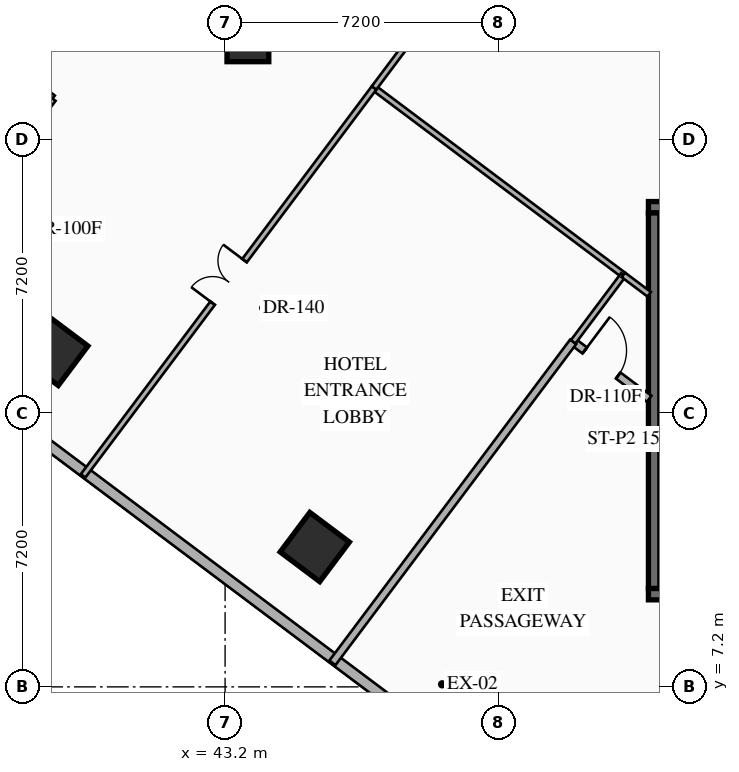
"""IFC4 building model, lengths in metres.
Left out: names, types, materials, properties, quantities, classifications, styles, units other than length and angle.
Written with IfcOpenShell. Run it as: python <this file> out.ifc"""

import sys

from ifc_helpers import new_model, si_unit, direction, frame, frame_2d, origin, origin_2d, place, context, subcontext, project, spatial, rectangle, extrude, element, fill, save


model = new_model("IFC4")
c1 = context("Model", 3, precision=1e-05, world=origin(), true_north=direction((0.0, 1.0)))
c2 = subcontext(c1, "Body", "Model", "MODEL_VIEW")
j1 = project(units=[si_unit("LENGTHUNIT", "METRE"), si_unit("PLANEANGLEUNIT", "RADIAN")], contexts=[c1])
p1 = place(None, origin())
s1 = spatial("IfcSite", under=j1, at=p1, CompositionType="ELEMENT")
p2 = place(p1, origin())
s2 = spatial("IfcBuilding", under=s1, at=p2, CompositionType="ELEMENT")
p3 = place(p2, origin())
s3 = spatial("IfcBuildingStorey", under=s2, at=p3, CompositionType="ELEMENT", Elevation=0.0)
p4 = place(p3, frame((54.34, 9.64, 0.0), z_axis=(0.0, 0.0, 1.0), x_axis=(1.0, 0.0, 0.0)))
e1 = element("IfcWall", 1, at=p4, inside=s3, PredefinedType="SHEAR", context=c2, shape_type="SweptSolid", body=[
    extrude(rectangle(XDim=5.17, YDim=0.3, at=frame_2d((2.585, 0.0))), origin(), (0.0, 0.0, 1.0), 5.4),
])
p5 = place(p4, frame((2.06, 0.0, 0.0)))
e2 = element("IfcOpeningElement", 2, at=p5, cuts=e1, PredefinedType="OPENING", context=c2, shape_type="SweptSolid", body=[
    extrude(rectangle(XDim=1.1, YDim=2.2, at=frame_2d((0.55, 1.1))), frame((0.0, 0.16, 0.0), z_axis=(0.0, -1.0, 0.0), x_axis=(1.0, 0.0, 0.0)), (0.0, 0.0, 1.0), 0.32),
])
p6 = place(p3, frame((54.34, 19.82, 0.0), z_axis=(0.0, 0.0, 1.0), x_axis=(1.0, 0.0, 0.0)))
e3 = element("IfcWall", 3, at=p6, inside=s3, PredefinedType="SHEAR", context=c2, shape_type="SweptSolid", body=[
    extrude(rectangle(XDim=5.17, YDim=0.3, at=frame_2d((2.585, 0.0))), origin(), (0.0, 0.0, 1.0), 5.4),
])
p7 = place(p3, frame((54.49, 9.79, 0.0), z_axis=(0.0, 0.0, 1.0), x_axis=(0.0, 1.0, 0.0)))
e4 = element("IfcWall", 4, at=p7, inside=s3, PredefinedType="SHEAR", context=c2, shape_type="SweptSolid", body=[
    extrude(rectangle(XDim=9.88, YDim=0.3, at=frame_2d((4.94, 0.0))), origin(), (0.0, 0.0, 1.0), 5.4),
])
p8 = place(p3, frame((43.8, 24.2, 0.0), z_axis=(0.0, 0.0, 1.0), x_axis=(1.0, 0.0, 0.0)))
e5 = element("IfcColumn", 5, at=p8, inside=s3, PredefinedType="COLUMN", context=c2, shape_type="SweptSolid", body=[
    extrude(rectangle(XDim=1.1, YDim=1.1, at=origin_2d()), origin(), (0.0, 0.0, 1.0), 5.4),
])
for number, where, z_axis, x_axis in (
    (6, (38.68, 16.04, 0.0), (0.0, 0.0, 1.0), (0.8, -0.6, 0.0)),
    (7, (45.56, 10.88, 0.0), (0.0, 0.0, 1.0), (0.8, -0.6, 0.0)),
):
    element("IfcColumn", number, at=place(p3, frame(where, z_axis=z_axis, x_axis=x_axis)), inside=s3, PredefinedType="COLUMN", context=c2, shape_type="SweptSolid", body=[
        extrude(rectangle(XDim=1.3, YDim=1.3, at=origin_2d()), origin(), (0.0, 0.0, 1.0), 5.4),
    ])
p9 = place(p3, frame((44.86, 40.73, 0.0), z_axis=(0.0, 0.0, 1.0), x_axis=(0.800006570398, -0.599991239369, 0.0)))
e8 = element("IfcWall", 8, at=p9, inside=s3, PredefinedType="STANDARD", context=c2, shape_type="SweptSolid", body=[
    extrude(rectangle(XDim=31.212, YDim=0.28, at=frame_2d((15.606, 0.0))), origin(), (0.0, 0.0, 1.0), 5.1),
])
p10 = place(p9, frame((4.5, 0.0, 0.0)))
e9 = element("IfcOpeningElement", 9, at=p10, cuts=e8, PredefinedType="OPENING", context=c2, shape_type="SweptSolid", body=[
    extrude(rectangle(XDim=2.1, YDim=2.3, at=frame_2d((1.05, 1.15))), frame((0.0, 0.15, 0.0), z_axis=(0.0, -1.0, 0.0), x_axis=(1.0, 0.0, 0.0)), (0.0, 0.0, 1.0), 0.3),
])
p11 = place(p9, frame((13.932, 0.0, 0.0)))
e10 = element("IfcOpeningElement", 10, at=p11, cuts=e8, PredefinedType="OPENING", context=c2, shape_type="SweptSolid", body=[
    extrude(rectangle(XDim=2.1, YDim=2.3, at=frame_2d((1.05, 1.15))), frame((0.0, 0.15, 0.0), z_axis=(0.0, -1.0, 0.0), x_axis=(1.0, 0.0, 0.0)), (0.0, 0.0, 1.0), 0.3),
])
p12 = place(p9, frame((21.423, 0.0, 0.0)))
e11 = element("IfcOpeningElement", 11, at=p12, cuts=e8, PredefinedType="OPENING", context=c2, shape_type="SweptSolid", body=[
    extrude(rectangle(XDim=2.1, YDim=2.3, at=frame_2d((1.05, 1.15))), frame((0.0, 0.15, 0.0), z_axis=(0.0, -1.0, 0.0), x_axis=(1.0, 0.0, 0.0)), (0.0, 0.0, 1.0), 0.3),
])
p13 = place(p9, frame((25.168, 0.0, 0.0)))
e12 = element("IfcOpeningElement", 12, at=p13, cuts=e8, PredefinedType="OPENING", context=c2, shape_type="SweptSolid", body=[
    extrude(rectangle(XDim=2.1, YDim=2.3, at=frame_2d((1.05, 1.15))), frame((0.0, 0.15, 0.0), z_axis=(0.0, -1.0, 0.0), x_axis=(1.0, 0.0, 0.0)), (0.0, 0.0, 1.0), 0.3),
])
p14 = place(p3, frame((54.518, 1.587, 0.0), z_axis=(0.0, 0.0, 1.0), x_axis=(-0.800001601415, 0.599997864774, 0.0)))
e13 = element("IfcWall", 13, at=p14, inside=s3, PredefinedType="STANDARD", context=c2, shape_type="SweptSolid", body=[
    extrude(rectangle(XDim=36.589, YDim=0.28, at=frame_2d((18.294, 0.0))), origin(), (0.0, 0.0, 1.0), 5.1),
])
p15 = place(p14, frame((6.844, 0.0, 0.0)))
e14 = element("IfcOpeningElement", 14, at=p15, cuts=e13, PredefinedType="OPENING", context=c2, shape_type="SweptSolid", body=[
    extrude(rectangle(XDim=2.1, YDim=2.3, at=frame_2d((1.05, 1.15))), frame((0.0, 0.15, 0.0), z_axis=(0.0, -1.0, 0.0), x_axis=(1.0, 0.0, 0.0)), (0.0, 0.0, 1.0), 0.3),
])
p16 = place(p14, frame((29.344, 0.0, 0.0)))
e15 = element("IfcOpeningElement", 15, at=p16, cuts=e13, PredefinedType="OPENING", context=c2, shape_type="SweptSolid", body=[
    extrude(rectangle(XDim=2.1, YDim=2.3, at=frame_2d((1.05, 1.15))), frame((0.0, 0.15, 0.0), z_axis=(0.0, -1.0, 0.0), x_axis=(1.0, 0.0, 0.0)), (0.0, 0.0, 1.0), 0.3),
])
p17 = place(p3, frame((52.36, 16.28, 0.0), z_axis=(0.0, 0.0, 1.0), x_axis=(0.8, -0.6, 0.0)))
e16 = element("IfcWall", 16, at=p17, inside=s3, PredefinedType="STANDARD", context=c2, shape_type="SweptSolid", body=[
    extrude(rectangle(XDim=2.5, YDim=0.2, at=frame_2d((1.25, 0.0))), origin(), (0.0, 0.0, 1.0), 5.1),
])
p18 = place(p17, frame((0.38, 0.0, 0.0)))
e17 = element("IfcOpeningElement", 17, at=p18, cuts=e16, PredefinedType="OPENING", context=c2, shape_type="SweptSolid", body=[
    extrude(rectangle(XDim=1.1, YDim=2.24, at=frame_2d((0.55, 1.12))), frame((0.0, 0.11, 0.0), z_axis=(0.0, -1.0, 0.0), x_axis=(1.0, 0.0, 0.0)), (0.0, 0.0, 1.0), 0.22),
])
p19 = place(p3, frame((46.024, 7.832, 0.0), z_axis=(0.0, 0.0, 1.0), x_axis=(0.600011097131, 0.799991677032, 0.0)))
e18 = element("IfcWall", 18, at=p19, inside=s3, PredefinedType="STANDARD", context=c2, shape_type="SweptSolid", body=[
    extrude(rectangle(XDim=10.56, YDim=0.2, at=frame_2d((5.28, 0.0))), origin(), (0.0, 0.0, 1.0), 5.1),
])
p20 = place(p3, frame((36.287, 24.46, 0.0), z_axis=(0.0, 0.0, 1.0), x_axis=(0.799930857749, -0.600092178603, 0.0)))
e19 = element("IfcWall", 19, at=p20, inside=s3, PredefinedType="STANDARD", context=c2, shape_type="SweptSolid", body=[
    extrude(rectangle(XDim=2.966, YDim=0.2, at=frame_2d((1.483, 0.0))), origin(), (0.0, 0.0, 1.0), 5.1),
])
p21 = place(p3, frame((34.184, 16.712, 0.0), z_axis=(0.0, 0.0, 1.0), x_axis=(0.599984290919, 0.80001178157, 0.0)))
e20 = element("IfcWall", 20, at=p21, inside=s3, PredefinedType="STANDARD", context=c2, shape_type="SweptSolid", body=[
    extrude(rectangle(XDim=7.46, YDim=0.2, at=frame_2d((3.73, 0.0))), origin(), (0.0, 0.0, 1.0), 5.1),
])
p22 = place(p21, frame((3.515, 0.0, 0.0)))
e21 = element("IfcOpeningElement", 21, at=p22, cuts=e20, PredefinedType="OPENING", context=c2, shape_type="SweptSolid", body=[
    extrude(rectangle(XDim=1.0, YDim=2.2, at=frame_2d((0.5, 1.1))), frame((0.0, 0.11, 0.0), z_axis=(0.0, -1.0, 0.0), x_axis=(1.0, 0.0, 0.0)), (0.0, 0.0, 1.0), 0.22),
])
p23 = place(p3, frame((47.12, 22.96, 0.0), z_axis=(0.0, 0.0, 1.0), x_axis=(0.799996427111, -0.600004763822, 0.0)))
e22 = element("IfcWall", 22, at=p23, inside=s3, PredefinedType="PARTITIONING", context=c2, shape_type="SweptSolid", body=[
    extrude(rectangle(XDim=8.2, YDim=0.15, at=frame_2d((4.1, 0.0))), origin(), (0.0, 0.0, 1.0), 5.1),
])
p24 = place(p3, frame((39.464, 12.752, 0.0), z_axis=(0.0, 0.0, 1.0), x_axis=(0.6, 0.8, 0.0)))
e23 = element("IfcWall", 23, at=p24, inside=s3, PredefinedType="PARTITIONING", context=c2, shape_type="SweptSolid", body=[
    extrude(rectangle(XDim=12.76, YDim=0.15, at=frame_2d((6.38, 0.0))), origin(), (0.0, 0.0, 1.0), 5.1),
])
p25 = place(p24, frame((5.68, 0.0, 0.0)))
e24 = element("IfcOpeningElement", 24, at=p25, cuts=e23, PredefinedType="OPENING", context=c2, shape_type="SweptSolid", body=[
    extrude(rectangle(XDim=1.4, YDim=2.3, at=frame_2d((0.7, 1.15))), frame((0.0, 0.085, 0.0), z_axis=(0.0, -1.0, 0.0), x_axis=(1.0, 0.0, 0.0)), (0.0, 0.0, 1.0), 0.17),
])
p26 = place(p3, frame((52.36, 16.28, 0.0), z_axis=(0.0, 0.0, 1.0), x_axis=(0.59994672926, 0.800039950284, 0.0)))
e25 = element("IfcWall", 25, at=p26, inside=s3, PredefinedType="PARTITIONING", context=c2, shape_type="SweptSolid", body=[
    extrude(rectangle(XDim=2.2, YDim=0.15, at=frame_2d((1.1, 0.0))), origin(), (0.0, 0.0, 1.0), 5.1),
])
p27 = place(p3, frame((53.68, 18.04, 0.0), z_axis=(0.0, 0.0, 1.0), x_axis=(0.800068916667, -0.599908100114, 0.0)))
e26 = element("IfcWall", 26, at=p27, inside=s3, PredefinedType="PARTITIONING", context=c2, shape_type="SweptSolid", body=[
    extrude(rectangle(XDim=0.85, YDim=0.15, at=frame_2d((0.425, 0.0))), origin(), (0.0, 0.0, 1.0), 5.1),
])
p28 = place(p3, frame((47.12, 22.96, 0.0), z_axis=(0.0, 0.0, 1.0), x_axis=(0.599996985882, 0.80000226058, 0.0)))
e27 = element("IfcWall", 27, at=p28, inside=s3, PredefinedType="PARTITIONING", context=c2, shape_type="SweptSolid", body=[
    extrude(rectangle(XDim=12.96, YDim=0.15, at=frame_2d((6.48, 0.0))), origin(), (0.0, 0.0, 1.0), 5.1),
])
p29 = place(p28, frame((6.485, 0.0, 0.0)))
e28 = element("IfcOpeningElement", 28, at=p29, cuts=e27, PredefinedType="OPENING", context=c2, shape_type="SweptSolid", body=[
    extrude(rectangle(XDim=1.1, YDim=2.16, at=frame_2d((0.55, 1.08))), frame((0.0, 0.085, 0.0), z_axis=(0.0, -1.0, 0.0), x_axis=(1.0, 0.0, 0.0)), (0.0, 0.0, 1.0), 0.17),
])
p30 = place(p18, origin())
e29 = element("IfcDoor", 29, at=p30, inside=s3, OperationType="SINGLE_SWING_LEFT", PredefinedType="DOOR", context=c2, shape_type="SweptSolid", body=[
    extrude(rectangle(XDim=1.1, YDim=2.24, at=frame_2d((0.55, 1.12))), frame((0.0, 0.025, 0.0), z_axis=(0.0, -1.0, 0.0), x_axis=(1.0, 0.0, 0.0)), (0.0, 0.0, 1.0), 0.05),
])
fill(e17, e29)
p31 = place(p25, origin())
e30 = element("IfcDoor", 30, at=p31, inside=s3, OperationType="DOUBLE_DOOR_SINGLE_SWING", PredefinedType="DOOR", context=c2, shape_type="SweptSolid", body=[
    extrude(rectangle(XDim=1.4, YDim=2.3, at=frame_2d((0.7, 1.15))), frame((0.0, 0.025, 0.0), z_axis=(0.0, -1.0, 0.0), x_axis=(1.0, 0.0, 0.0)), (0.0, 0.0, 1.0), 0.05),
])
fill(e24, e30)
save(model, sys.argv[1])
